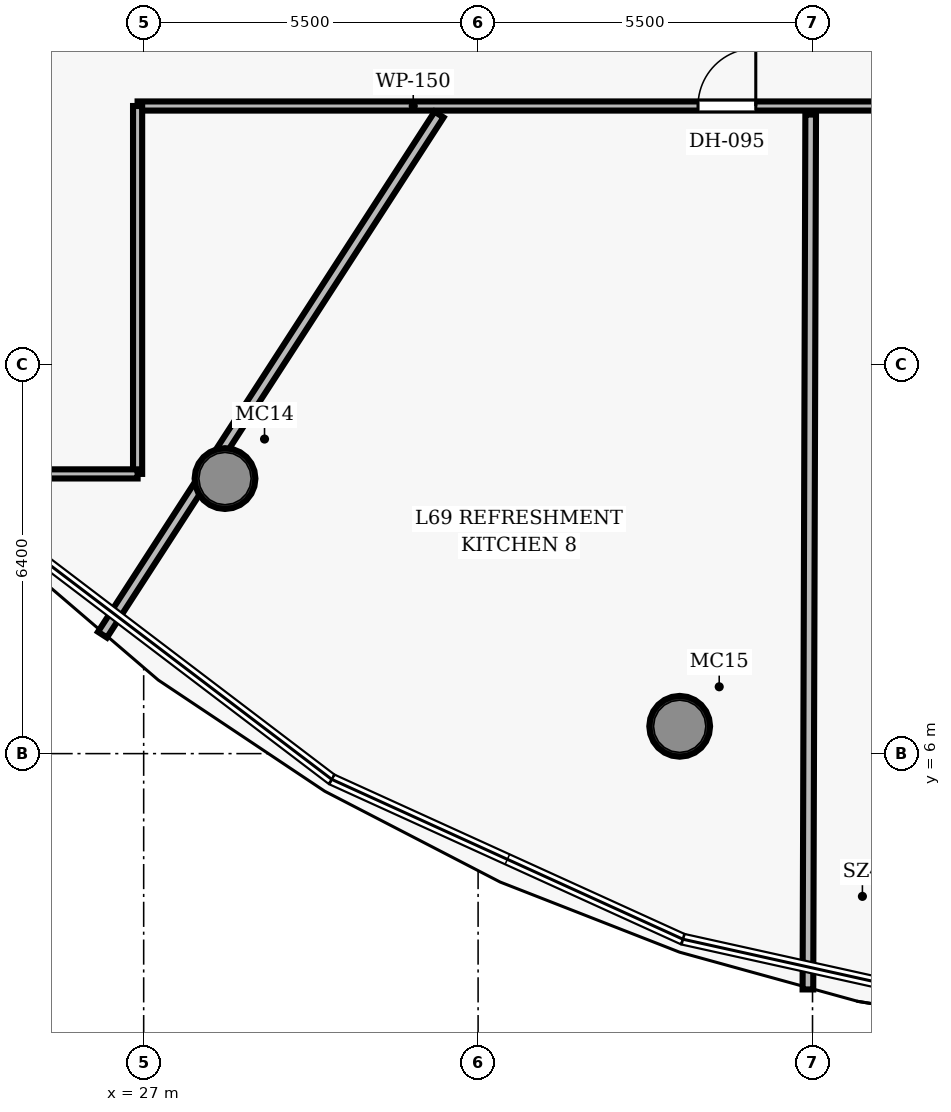
"""IFC4 building model, lengths in metres.
Left out: names, types, materials, properties, quantities, classifications, styles, units other than length and angle.
Written with IfcOpenShell. Run it as: python <this file> out.ifc"""

import sys

from ifc_helpers import new_model, si_unit, direction, frame, frame_2d, origin, origin_2d, place, context, subcontext, project, spatial, rectangle, hollow_circle, extrude, element, fill, save


model = new_model("IFC4")
c1 = context("Model", 3, precision=1e-05, world=origin(), true_north=direction((0.0, 1.0)))
c2 = subcontext(c1, "Body", "Model", "MODEL_VIEW")
j1 = project(units=[si_unit("LENGTHUNIT", "METRE"), si_unit("PLANEANGLEUNIT", "RADIAN")], contexts=[c1])
p1 = place(None, origin())
s1 = spatial("IfcSite", under=j1, at=p1, CompositionType="ELEMENT")
p2 = place(p1, origin())
s2 = spatial("IfcBuilding", under=s1, at=p2, CompositionType="ELEMENT")
p3 = place(p2, frame((0.0, 0.0, 272.85)))
s3 = spatial("IfcBuildingStorey", under=s2, at=p3, CompositionType="ELEMENT", Elevation=272.85)
for number, where, z_axis, x_axis in (
    (1, (28.338, 10.523, 0.0), (0.0, 0.0, 1.0), (1.0, 0.0, 0.0)),
    (2, (35.815, 6.449, 0.0), (0.0, 0.0, 1.0), (1.0, 0.0, 0.0)),
):
    element("IfcColumn", number, at=place(p3, frame(where, z_axis=z_axis, x_axis=x_axis)), inside=s3, PredefinedType="COLUMN", context=c2, shape_type="SweptSolid", body=[
        extrude(hollow_circle(Radius=0.5, WallThickness=0.045, at=origin_2d()), origin(), (0.0, 0.0, 1.0), 3.85),
    ])
p4 = place(p3, frame((26.9, 16.65, 0.0), z_axis=(0.0, 0.0, 1.0), x_axis=(1.0, 0.0, 0.0)))
e3 = element("IfcWall", 3, at=p4, inside=s3, PredefinedType="PARTITIONING", context=c2, shape_type="SweptSolid", body=[
    extrude(rectangle(XDim=22.2, YDim=0.15, at=frame_2d((11.1, 0.0))), origin(), (0.0, 0.0, 1.0), 3.04),
])
p5 = place(p4, frame((9.217, 0.0, 0.0)))
e4 = element("IfcOpeningElement", 4, at=p5, cuts=e3, PredefinedType="OPENING", context=c2, shape_type="SweptSolid", body=[
    extrude(rectangle(XDim=0.95, YDim=2.15, at=frame_2d((0.475, 1.075))), frame((0.0, 0.085, 0.0), z_axis=(0.0, -1.0, 0.0), x_axis=(1.0, 0.0, 0.0)), (0.0, 0.0, 1.0), 0.17),
])
p6 = place(p4, frame((14.636, 0.0, 0.0)))
e5 = element("IfcOpeningElement", 5, at=p6, cuts=e3, PredefinedType="OPENING", context=c2, shape_type="SweptSolid", body=[
    extrude(rectangle(XDim=0.95, YDim=2.15, at=frame_2d((0.475, 1.075))), frame((0.0, 0.085, 0.0), z_axis=(0.0, -1.0, 0.0), x_axis=(1.0, 0.0, 0.0)), (0.0, 0.0, 1.0), 0.17),
])
p7 = place(p4, frame((18.246, 0.0, 0.0)))
e6 = element("IfcOpeningElement", 6, at=p7, cuts=e3, PredefinedType="OPENING", context=c2, shape_type="SweptSolid", body=[
    extrude(rectangle(XDim=0.95, YDim=2.15, at=frame_2d((0.475, 1.075))), frame((0.0, 0.085, 0.0), z_axis=(0.0, -1.0, 0.0), x_axis=(1.0, 0.0, 0.0)), (0.0, 0.0, 1.0), 0.17),
])
p8 = place(p3, frame((26.9, 10.6, 0.0), z_axis=(0.0, 0.0, 1.0), x_axis=(0.0, 1.0, 0.0)))
e7 = element("IfcWall", 7, at=p8, inside=s3, PredefinedType="PARTITIONING", context=c2, shape_type="SweptSolid", body=[
    extrude(rectangle(XDim=6.05, YDim=0.15, at=frame_2d((3.025, 0.0))), origin(), (0.0, 0.0, 1.0), 3.04),
])
p9 = place(p3, frame((24.8, 10.6, 0.0), z_axis=(0.0, 0.0, 1.0), x_axis=(1.0, 0.0, 0.0)))
e8 = element("IfcWall", 8, at=p9, inside=s3, PredefinedType="PARTITIONING", context=c2, shape_type="SweptSolid", body=[
    extrude(rectangle(XDim=2.1, YDim=0.15, at=frame_2d((1.05, 0.0))), origin(), (0.0, 0.0, 1.0), 3.04),
])
p10 = place(p3, frame((31.858, 16.51, 0.0), z_axis=(0.0, 0.0, 1.0), x_axis=(-0.543286048466, -0.839547657696, 0.0)))
e9 = element("IfcWall", 9, at=p10, inside=s3, PredefinedType="PARTITIONING", context=c2, shape_type="SweptSolid", body=[
    extrude(rectangle(XDim=10.19, YDim=0.175, at=frame_2d((5.095, 0.0))), origin(), (0.0, 0.0, 1.0), 3.04),
])
p11 = place(p3, frame((37.97, 16.51, 0.0), z_axis=(0.0, 0.0, 1.0), x_axis=(-0.003173025056, -0.999994965943, 0.0)))
e10 = element("IfcWall", 10, at=p11, inside=s3, PredefinedType="PARTITIONING", context=c2, shape_type="SweptSolid", body=[
    extrude(rectangle(XDim=14.388, YDim=0.175, at=frame_2d((7.194, 0.0))), origin(), (0.0, 0.0, 1.0), 3.04),
])
p12 = place(p5, origin())
e11 = element("IfcDoor", 11, at=p12, inside=s3, OperationType="SINGLE_SWING_RIGHT", PredefinedType="DOOR", context=c2, shape_type="SweptSolid", body=[
    extrude(rectangle(XDim=0.95, YDim=2.15, at=frame_2d((0.475, 1.075))), frame((0.0, 0.025, 0.0), z_axis=(0.0, -1.0, 0.0), x_axis=(1.0, 0.0, 0.0)), (0.0, 0.0, 1.0), 0.05),
])
fill(e4, e11)
save(model, sys.argv[1])
